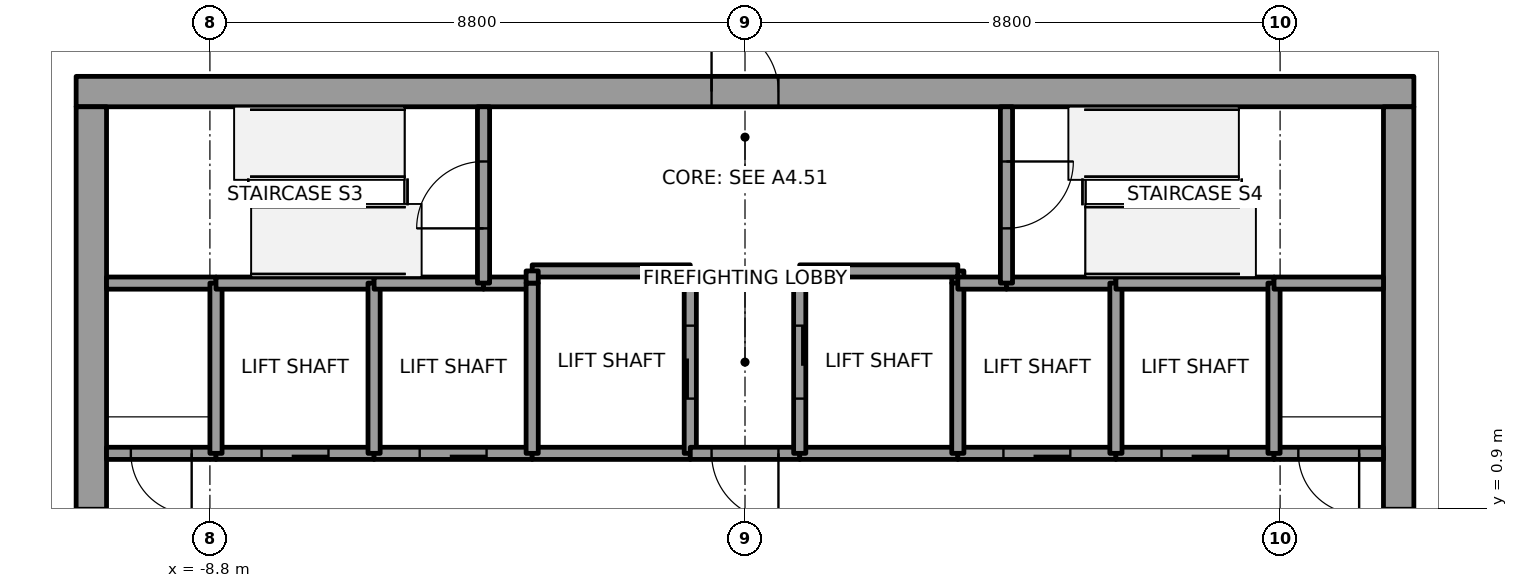
"""IFC4 building model, lengths in metres.
Left out: names, types, materials, properties, quantities, classifications, styles, units other than length and angle.
Written with IfcOpenShell. Run it as: python <this file> out.ifc"""

import sys

from ifc_helpers import new_model, si_unit, direction, frame, frame_2d, origin, place, context, subcontext, project, spatial, rectangle, extrude, element, fill, save


model = new_model("IFC4")
c1 = context("Model", 3, precision=1e-05, world=origin(), true_north=direction((0.0, 1.0)))
c2 = subcontext(c1, "Body", "Model", "MODEL_VIEW")
j1 = project(units=[si_unit("LENGTHUNIT", "METRE"), si_unit("PLANEANGLEUNIT", "RADIAN")], contexts=[c1])
p1 = place(None, origin())
s1 = spatial("IfcSite", under=j1, at=p1, CompositionType="ELEMENT")
p2 = place(p1, origin())
s2 = spatial("IfcBuilding", under=s1, at=p2, CompositionType="ELEMENT")
p3 = place(p2, frame((0.0, 0.0, 219.8)))
s3 = spatial("IfcBuildingStorey", under=s2, at=p3, CompositionType="ELEMENT", Elevation=219.8)
p4 = place(p3, frame((-11.0, 7.75, 0.0), z_axis=(0.0, 0.0, 1.0), x_axis=(1.0, 0.0, 0.0)))
e1 = element("IfcWall", 1, at=p4, inside=s3, PredefinedType="SHEAR", context=c2, shape_type="SweptSolid", body=[
    extrude(rectangle(XDim=22.0, YDim=0.5, at=frame_2d((11.0, 0.0))), origin(), (0.0, 0.0, 1.0), 7.2),
])
p5 = place(p4, frame((10.45, 0.0, 0.0)))
e2 = element("IfcOpeningElement", 2, at=p5, cuts=e1, PredefinedType="OPENING", context=c2, shape_type="SweptSolid", body=[
    extrude(rectangle(XDim=1.1, YDim=2.1, at=frame_2d((0.55, 1.05))), frame((0.0, 0.25, 0.0), z_axis=(0.0, -1.0, 0.0), x_axis=(1.0, 0.0, 0.0)), (0.0, 0.0, 1.0), 0.5),
])
p6 = place(p3, frame((-10.75, -7.5, 0.0), z_axis=(0.0, 0.0, 1.0), x_axis=(0.0, 1.0, 0.0)))
e3 = element("IfcWall", 3, at=p6, inside=s3, PredefinedType="SHEAR", context=c2, shape_type="SweptSolid", body=[
    extrude(rectangle(XDim=15.0, YDim=0.5, at=frame_2d((7.5, 0.0))), origin(), (0.0, 0.0, 1.0), 7.2),
])
p7 = place(p6, frame((6.6, 0.0, 0.0)))
e4 = element("IfcOpeningElement", 4, at=p7, cuts=e3, PredefinedType="OPENING", context=c2, shape_type="SweptSolid", body=[
    extrude(rectangle(XDim=1.8, YDim=2.1, at=frame_2d((0.9, 1.05))), frame((0.0, 0.25, 0.0), z_axis=(0.0, -1.0, 0.0), x_axis=(1.0, 0.0, 0.0)), (0.0, 0.0, 1.0), 0.5),
])
p8 = place(p3, frame((10.75, -7.5, 0.0), z_axis=(0.0, 0.0, 1.0), x_axis=(0.0, 1.0, 0.0)))
e5 = element("IfcWall", 5, at=p8, inside=s3, PredefinedType="SHEAR", context=c2, shape_type="SweptSolid", body=[
    extrude(rectangle(XDim=15.0, YDim=0.5, at=frame_2d((7.5, 0.0))), origin(), (0.0, 0.0, 1.0), 7.2),
])
p9 = place(p8, frame((6.6, 0.0, 0.0)))
e6 = element("IfcOpeningElement", 6, at=p9, cuts=e5, PredefinedType="OPENING", context=c2, shape_type="SweptSolid", body=[
    extrude(rectangle(XDim=1.8, YDim=2.1, at=frame_2d((0.9, 1.05))), frame((0.0, 0.25, 0.0), z_axis=(0.0, -1.0, 0.0), x_axis=(1.0, 0.0, 0.0)), (0.0, 0.0, 1.0), 0.5),
])
p10 = place(p3, frame((-8.7, 1.8, 0.0), z_axis=(0.0, 0.0, 1.0), x_axis=(-1.0, 0.0, 0.0)))
e7 = element("IfcWall", 7, at=p10, inside=s3, PredefinedType="SOLIDWALL", context=c2, shape_type="SweptSolid", body=[
    extrude(rectangle(XDim=1.8, YDim=0.2, at=frame_2d((0.9, 0.0))), origin(), (0.0, 0.0, 1.0), 7.05),
])
p11 = place(p10, frame((0.4, 0.0, 0.0)))
e8 = element("IfcOpeningElement", 8, at=p11, cuts=e7, PredefinedType="OPENING", context=c2, shape_type="SweptSolid", body=[
    extrude(rectangle(XDim=1.0, YDim=2.1, at=frame_2d((0.5, 1.05))), frame((0.0, 0.1, 0.0), z_axis=(0.0, -1.0, 0.0), x_axis=(1.0, 0.0, 0.0)), (0.0, 0.0, 1.0), 0.2),
])
p12 = place(p3, frame((-8.7, 4.6, 0.0), z_axis=(0.0, 0.0, 1.0), x_axis=(-1.0, 0.0, 0.0)))
e9 = element("IfcWall", 9, at=p12, inside=s3, PredefinedType="SOLIDWALL", context=c2, shape_type="SweptSolid", body=[
    extrude(rectangle(XDim=1.8, YDim=0.2, at=frame_2d((0.9, 0.0))), origin(), (0.0, 0.0, 1.0), 7.05),
])
p13 = place(p3, frame((-6.1, 1.8, 0.0), z_axis=(0.0, 0.0, 1.0), x_axis=(-1.0, 0.0, 0.0)))
e10 = element("IfcWall", 10, at=p13, inside=s3, PredefinedType="SOLIDWALL", context=c2, shape_type="SweptSolid", body=[
    extrude(rectangle(XDim=2.6, YDim=0.2, at=frame_2d((1.3, 0.0))), origin(), (0.0, 0.0, 1.0), 7.05),
])
p14 = place(p13, frame((0.75, 0.0, 0.0)))
e11 = element("IfcOpeningElement", 11, at=p14, cuts=e10, PredefinedType="OPENING", context=c2, shape_type="SweptSolid", body=[
    extrude(rectangle(XDim=1.1, YDim=2.1, at=frame_2d((0.55, 1.05))), frame((0.0, 0.1, 0.0), z_axis=(0.0, -1.0, 0.0), x_axis=(1.0, 0.0, 0.0)), (0.0, 0.0, 1.0), 0.2),
])
p15 = place(p3, frame((-8.7, 1.8, 0.0), z_axis=(0.0, 0.0, 1.0), x_axis=(0.0, 1.0, 0.0)))
e12 = element("IfcWall", 12, at=p15, inside=s3, PredefinedType="SOLIDWALL", context=c2, shape_type="SweptSolid", body=[
    extrude(rectangle(XDim=2.8, YDim=0.2, at=frame_2d((1.4, 0.0))), origin(), (0.0, 0.0, 1.0), 7.05),
])
p16 = place(p3, frame((-6.1, 4.6, 0.0), z_axis=(0.0, 0.0, 1.0), x_axis=(-1.0, 0.0, 0.0)))
e13 = element("IfcWall", 13, at=p16, inside=s3, PredefinedType="SOLIDWALL", context=c2, shape_type="SweptSolid", body=[
    extrude(rectangle(XDim=2.6, YDim=0.2, at=frame_2d((1.3, 0.0))), origin(), (0.0, 0.0, 1.0), 7.05),
])
p17 = place(p3, frame((-3.5, 1.8, 0.0), z_axis=(0.0, 0.0, 1.0), x_axis=(-1.0, 0.0, 0.0)))
e14 = element("IfcWall", 14, at=p17, inside=s3, PredefinedType="SOLIDWALL", context=c2, shape_type="SweptSolid", body=[
    extrude(rectangle(XDim=2.6, YDim=0.2, at=frame_2d((1.3, 0.0))), origin(), (0.0, 0.0, 1.0), 7.05),
])
p18 = place(p17, frame((0.75, 0.0, 0.0)))
e15 = element("IfcOpeningElement", 15, at=p18, cuts=e14, PredefinedType="OPENING", context=c2, shape_type="SweptSolid", body=[
    extrude(rectangle(XDim=1.1, YDim=2.1, at=frame_2d((0.55, 1.05))), frame((0.0, 0.1, 0.0), z_axis=(0.0, -1.0, 0.0), x_axis=(1.0, 0.0, 0.0)), (0.0, 0.0, 1.0), 0.2),
])
p19 = place(p3, frame((-6.1, 1.8, 0.0), z_axis=(0.0, 0.0, 1.0), x_axis=(0.0, 1.0, 0.0)))
e16 = element("IfcWall", 16, at=p19, inside=s3, PredefinedType="SOLIDWALL", context=c2, shape_type="SweptSolid", body=[
    extrude(rectangle(XDim=2.8, YDim=0.2, at=frame_2d((1.4, 0.0))), origin(), (0.0, 0.0, 1.0), 7.05),
])
p20 = place(p3, frame((-4.3, 4.6, 0.0), z_axis=(0.0, 0.0, 1.0), x_axis=(-1.0, 0.0, 0.0)))
e17 = element("IfcWall", 17, at=p20, inside=s3, PredefinedType="SOLIDWALL", context=c2, shape_type="SweptSolid", body=[
    extrude(rectangle(XDim=1.8, YDim=0.2, at=frame_2d((0.9, 0.0))), origin(), (0.0, 0.0, 1.0), 7.05),
])
p21 = place(p3, frame((-3.5, 4.6, 0.0), z_axis=(0.0, 0.0, 1.0), x_axis=(-1.0, 0.0, 0.0)))
e18 = element("IfcWall", 18, at=p21, inside=s3, PredefinedType="SOLIDWALL", context=c2, shape_type="SweptSolid", body=[
    extrude(rectangle(XDim=0.8, YDim=0.2, at=frame_2d((0.4, 0.0))), origin(), (0.0, 0.0, 1.0), 7.05),
])
p22 = place(p3, frame((-4.3, 4.6, 0.0), z_axis=(0.0, 0.0, 1.0), x_axis=(0.0, 1.0, 0.0)))
e19 = element("IfcWall", 19, at=p22, inside=s3, PredefinedType="SOLIDWALL", context=c2, shape_type="SweptSolid", body=[
    extrude(rectangle(XDim=2.9, YDim=0.2, at=frame_2d((1.45, 0.0))), origin(), (0.0, 0.0, 1.0), 7.05),
])
p23 = place(p22, frame((0.9, 0.0, 0.0)))
e20 = element("IfcOpeningElement", 20, at=p23, cuts=e19, PredefinedType="OPENING", context=c2, shape_type="SweptSolid", body=[
    extrude(rectangle(XDim=1.1, YDim=2.1, at=frame_2d((0.55, 1.05))), frame((0.0, 0.1, 0.0), z_axis=(0.0, -1.0, 0.0), x_axis=(1.0, 0.0, 0.0)), (0.0, 0.0, 1.0), 0.2),
])
p24 = place(p3, frame((-0.9, 1.8, 0.0), z_axis=(0.0, 0.0, 1.0), x_axis=(-1.0, 0.0, 0.0)))
e21 = element("IfcWall", 21, at=p24, inside=s3, PredefinedType="SOLIDWALL", context=c2, shape_type="SweptSolid", body=[
    extrude(rectangle(XDim=2.6, YDim=0.2, at=frame_2d((1.3, 0.0))), origin(), (0.0, 0.0, 1.0), 7.05),
])
p25 = place(p3, frame((-3.5, 4.6, 0.0), z_axis=(0.0, 0.0, 1.0), x_axis=(0.0, -1.0, 0.0)))
e22 = element("IfcWall", 22, at=p25, inside=s3, PredefinedType="SOLIDWALL", context=c2, shape_type="SweptSolid", body=[
    extrude(rectangle(XDim=2.8, YDim=0.2, at=frame_2d((1.4, 0.0))), origin(), (0.0, 0.0, 1.0), 7.05),
])
p26 = place(p3, frame((-0.9, 1.8, 0.0), z_axis=(0.0, 0.0, 1.0), x_axis=(0.0, 1.0, 0.0)))
e23 = element("IfcWall", 23, at=p26, inside=s3, PredefinedType="SOLIDWALL", context=c2, shape_type="SweptSolid", body=[
    extrude(rectangle(XDim=3.0, YDim=0.2, at=frame_2d((1.5, 0.0))), origin(), (0.0, 0.0, 1.0), 7.05),
])
p27 = place(p26, frame((0.9, 0.0, 0.0)))
e24 = element("IfcOpeningElement", 24, at=p27, cuts=e23, PredefinedType="OPENING", context=c2, shape_type="SweptSolid", body=[
    extrude(rectangle(XDim=1.2, YDim=2.1, at=frame_2d((0.6, 1.05))), frame((0.0, 0.1, 0.0), z_axis=(0.0, -1.0, 0.0), x_axis=(1.0, 0.0, 0.0)), (0.0, 0.0, 1.0), 0.2),
])
p28 = place(p3, frame((-0.9, 4.8, 0.0), z_axis=(0.0, 0.0, 1.0), x_axis=(-1.0, 0.0, 0.0)))
e25 = element("IfcWall", 25, at=p28, inside=s3, PredefinedType="SOLIDWALL", context=c2, shape_type="SweptSolid", body=[
    extrude(rectangle(XDim=2.6, YDim=0.2, at=frame_2d((1.3, 0.0))), origin(), (0.0, 0.0, 1.0), 7.05),
])
p29 = place(p3, frame((-3.5, 4.8, 0.0), z_axis=(0.0, 0.0, 1.0), x_axis=(0.0, -1.0, 0.0)))
e26 = element("IfcWall", 26, at=p29, inside=s3, PredefinedType="SOLIDWALL", context=c2, shape_type="SweptSolid", body=[
    extrude(rectangle(XDim=0.2, YDim=0.2, at=frame_2d((0.1, 0.0))), origin(), (0.0, 0.0, 1.0), 7.05),
])
p30 = place(p3, frame((0.9, 1.8, 0.0), z_axis=(0.0, 0.0, 1.0), x_axis=(-1.0, 0.0, 0.0)))
e27 = element("IfcWall", 27, at=p30, inside=s3, PredefinedType="SOLIDWALL", context=c2, shape_type="SweptSolid", body=[
    extrude(rectangle(XDim=1.8, YDim=0.2, at=frame_2d((0.9, 0.0))), origin(), (0.0, 0.0, 1.0), 7.05),
])
p31 = place(p30, frame((0.35, 0.0, 0.0)))
e28 = element("IfcOpeningElement", 28, at=p31, cuts=e27, PredefinedType="OPENING", context=c2, shape_type="SweptSolid", body=[
    extrude(rectangle(XDim=1.1, YDim=2.1, at=frame_2d((0.55, 1.05))), frame((0.0, 0.1, 0.0), z_axis=(0.0, -1.0, 0.0), x_axis=(1.0, 0.0, 0.0)), (0.0, 0.0, 1.0), 0.2),
])
p32 = place(p3, frame((3.5, 1.8, 0.0), z_axis=(0.0, 0.0, 1.0), x_axis=(-1.0, 0.0, 0.0)))
e29 = element("IfcWall", 29, at=p32, inside=s3, PredefinedType="SOLIDWALL", context=c2, shape_type="SweptSolid", body=[
    extrude(rectangle(XDim=2.6, YDim=0.2, at=frame_2d((1.3, 0.0))), origin(), (0.0, 0.0, 1.0), 7.05),
])
p33 = place(p3, frame((3.5, 4.6, 0.0), z_axis=(0.0, 0.0, 1.0), x_axis=(0.0, 1.0, 0.0)))
e30 = element("IfcWall", 30, at=p33, inside=s3, PredefinedType="SOLIDWALL", context=c2, shape_type="SweptSolid", body=[
    extrude(rectangle(XDim=0.2, YDim=0.2, at=frame_2d((0.1, 0.0))), origin(), (0.0, 0.0, 1.0), 7.05),
])
p34 = place(p3, frame((3.5, 4.8, 0.0), z_axis=(0.0, 0.0, 1.0), x_axis=(-1.0, 0.0, 0.0)))
e31 = element("IfcWall", 31, at=p34, inside=s3, PredefinedType="SOLIDWALL", context=c2, shape_type="SweptSolid", body=[
    extrude(rectangle(XDim=2.6, YDim=0.2, at=frame_2d((1.3, 0.0))), origin(), (0.0, 0.0, 1.0), 7.05),
])
p35 = place(p3, frame((0.9, 4.8, 0.0), z_axis=(0.0, 0.0, 1.0), x_axis=(0.0, -1.0, 0.0)))
e32 = element("IfcWall", 32, at=p35, inside=s3, PredefinedType="SOLIDWALL", context=c2, shape_type="SweptSolid", body=[
    extrude(rectangle(XDim=3.0, YDim=0.2, at=frame_2d((1.5, 0.0))), origin(), (0.0, 0.0, 1.0), 7.05),
])
p36 = place(p35, frame((0.9, 0.0, 0.0)))
e33 = element("IfcOpeningElement", 33, at=p36, cuts=e32, PredefinedType="OPENING", context=c2, shape_type="SweptSolid", body=[
    extrude(rectangle(XDim=1.2, YDim=2.1, at=frame_2d((0.6, 1.05))), frame((0.0, 0.1, 0.0), z_axis=(0.0, -1.0, 0.0), x_axis=(1.0, 0.0, 0.0)), (0.0, 0.0, 1.0), 0.2),
])
p37 = place(p3, frame((6.1, 1.8, 0.0), z_axis=(0.0, 0.0, 1.0), x_axis=(-1.0, 0.0, 0.0)))
e34 = element("IfcWall", 34, at=p37, inside=s3, PredefinedType="SOLIDWALL", context=c2, shape_type="SweptSolid", body=[
    extrude(rectangle(XDim=2.6, YDim=0.2, at=frame_2d((1.3, 0.0))), origin(), (0.0, 0.0, 1.0), 7.05),
])
p38 = place(p37, frame((0.75, 0.0, 0.0)))
e35 = element("IfcOpeningElement", 35, at=p38, cuts=e34, PredefinedType="OPENING", context=c2, shape_type="SweptSolid", body=[
    extrude(rectangle(XDim=1.1, YDim=2.1, at=frame_2d((0.55, 1.05))), frame((0.0, 0.1, 0.0), z_axis=(0.0, -1.0, 0.0), x_axis=(1.0, 0.0, 0.0)), (0.0, 0.0, 1.0), 0.2),
])
p39 = place(p3, frame((3.5, 1.8, 0.0), z_axis=(0.0, 0.0, 1.0), x_axis=(0.0, 1.0, 0.0)))
e36 = element("IfcWall", 36, at=p39, inside=s3, PredefinedType="SOLIDWALL", context=c2, shape_type="SweptSolid", body=[
    extrude(rectangle(XDim=2.8, YDim=0.2, at=frame_2d((1.4, 0.0))), origin(), (0.0, 0.0, 1.0), 7.05),
])
p40 = place(p3, frame((4.3, 4.6, 0.0), z_axis=(0.0, 0.0, 1.0), x_axis=(-1.0, 0.0, 0.0)))
e37 = element("IfcWall", 37, at=p40, inside=s3, PredefinedType="SOLIDWALL", context=c2, shape_type="SweptSolid", body=[
    extrude(rectangle(XDim=0.8, YDim=0.2, at=frame_2d((0.4, 0.0))), origin(), (0.0, 0.0, 1.0), 7.05),
])
p41 = place(p3, frame((6.1, 4.6, 0.0), z_axis=(0.0, 0.0, 1.0), x_axis=(-1.0, 0.0, 0.0)))
e38 = element("IfcWall", 38, at=p41, inside=s3, PredefinedType="SOLIDWALL", context=c2, shape_type="SweptSolid", body=[
    extrude(rectangle(XDim=1.8, YDim=0.2, at=frame_2d((0.9, 0.0))), origin(), (0.0, 0.0, 1.0), 7.05),
])
p42 = place(p3, frame((4.3, 7.5, 0.0), z_axis=(0.0, 0.0, 1.0), x_axis=(0.0, -1.0, 0.0)))
e39 = element("IfcWall", 39, at=p42, inside=s3, PredefinedType="SOLIDWALL", context=c2, shape_type="SweptSolid", body=[
    extrude(rectangle(XDim=2.9, YDim=0.2, at=frame_2d((1.45, 0.0))), origin(), (0.0, 0.0, 1.0), 7.05),
])
p43 = place(p42, frame((0.9, 0.0, 0.0)))
e40 = element("IfcOpeningElement", 40, at=p43, cuts=e39, PredefinedType="OPENING", context=c2, shape_type="SweptSolid", body=[
    extrude(rectangle(XDim=1.1, YDim=2.1, at=frame_2d((0.55, 1.05))), frame((0.0, 0.1, 0.0), z_axis=(0.0, -1.0, 0.0), x_axis=(1.0, 0.0, 0.0)), (0.0, 0.0, 1.0), 0.2),
])
p44 = place(p3, frame((8.7, 1.8, 0.0), z_axis=(0.0, 0.0, 1.0), x_axis=(-1.0, 0.0, 0.0)))
e41 = element("IfcWall", 41, at=p44, inside=s3, PredefinedType="SOLIDWALL", context=c2, shape_type="SweptSolid", body=[
    extrude(rectangle(XDim=2.6, YDim=0.2, at=frame_2d((1.3, 0.0))), origin(), (0.0, 0.0, 1.0), 7.05),
])
p45 = place(p44, frame((0.75, 0.0, 0.0)))
e42 = element("IfcOpeningElement", 42, at=p45, cuts=e41, PredefinedType="OPENING", context=c2, shape_type="SweptSolid", body=[
    extrude(rectangle(XDim=1.1, YDim=2.1, at=frame_2d((0.55, 1.05))), frame((0.0, 0.1, 0.0), z_axis=(0.0, -1.0, 0.0), x_axis=(1.0, 0.0, 0.0)), (0.0, 0.0, 1.0), 0.2),
])
p46 = place(p3, frame((6.1, 1.8, 0.0), z_axis=(0.0, 0.0, 1.0), x_axis=(0.0, 1.0, 0.0)))
e43 = element("IfcWall", 43, at=p46, inside=s3, PredefinedType="SOLIDWALL", context=c2, shape_type="SweptSolid", body=[
    extrude(rectangle(XDim=2.8, YDim=0.2, at=frame_2d((1.4, 0.0))), origin(), (0.0, 0.0, 1.0), 7.05),
])
p47 = place(p3, frame((8.7, 4.6, 0.0), z_axis=(0.0, 0.0, 1.0), x_axis=(-1.0, 0.0, 0.0)))
e44 = element("IfcWall", 44, at=p47, inside=s3, PredefinedType="SOLIDWALL", context=c2, shape_type="SweptSolid", body=[
    extrude(rectangle(XDim=2.6, YDim=0.2, at=frame_2d((1.3, 0.0))), origin(), (0.0, 0.0, 1.0), 7.05),
])
p48 = place(p3, frame((10.5, 1.8, 0.0), z_axis=(0.0, 0.0, 1.0), x_axis=(-1.0, 0.0, 0.0)))
e45 = element("IfcWall", 45, at=p48, inside=s3, PredefinedType="SOLIDWALL", context=c2, shape_type="SweptSolid", body=[
    extrude(rectangle(XDim=1.8, YDim=0.2, at=frame_2d((0.9, 0.0))), origin(), (0.0, 0.0, 1.0), 7.05),
])
p49 = place(p48, frame((0.4, 0.0, 0.0)))
e46 = element("IfcOpeningElement", 46, at=p49, cuts=e45, PredefinedType="OPENING", context=c2, shape_type="SweptSolid", body=[
    extrude(rectangle(XDim=1.0, YDim=2.1, at=frame_2d((0.5, 1.05))), frame((0.0, 0.1, 0.0), z_axis=(0.0, -1.0, 0.0), x_axis=(1.0, 0.0, 0.0)), (0.0, 0.0, 1.0), 0.2),
])
p50 = place(p3, frame((8.7, 4.6, 0.0), z_axis=(0.0, 0.0, 1.0), x_axis=(0.0, -1.0, 0.0)))
e47 = element("IfcWall", 47, at=p50, inside=s3, PredefinedType="SOLIDWALL", context=c2, shape_type="SweptSolid", body=[
    extrude(rectangle(XDim=2.8, YDim=0.2, at=frame_2d((1.4, 0.0))), origin(), (0.0, 0.0, 1.0), 7.05),
])
p51 = place(p3, frame((10.5, 4.6, 0.0), z_axis=(0.0, 0.0, 1.0), x_axis=(-1.0, 0.0, 0.0)))
e48 = element("IfcWall", 48, at=p51, inside=s3, PredefinedType="SOLIDWALL", context=c2, shape_type="SweptSolid", body=[
    extrude(rectangle(XDim=1.8, YDim=0.2, at=frame_2d((0.9, 0.0))), origin(), (0.0, 0.0, 1.0), 7.05),
])
p52 = place(p14, origin())
e49 = element("IfcDoor", 49, at=p52, inside=s3, OperationType="SLIDING_TO_RIGHT", PredefinedType="DOOR", context=c2, shape_type="SweptSolid", body=[
    extrude(rectangle(XDim=1.1, YDim=2.1, at=frame_2d((0.55, 1.05))), frame((0.0, 0.025, 0.0), z_axis=(0.0, -1.0, 0.0), x_axis=(1.0, 0.0, 0.0)), (0.0, 0.0, 1.0), 0.05),
])
fill(e11, e49)
p53 = place(p18, origin())
e50 = element("IfcDoor", 50, at=p53, inside=s3, OperationType="SLIDING_TO_LEFT", PredefinedType="DOOR", context=c2, shape_type="SweptSolid", body=[
    extrude(rectangle(XDim=1.1, YDim=2.1, at=frame_2d((0.55, 1.05))), frame((0.0, 0.025, 0.0), z_axis=(0.0, -1.0, 0.0), x_axis=(1.0, 0.0, 0.0)), (0.0, 0.0, 1.0), 0.05),
])
fill(e15, e50)
p54 = place(p38, origin())
e51 = element("IfcDoor", 51, at=p54, inside=s3, OperationType="SLIDING_TO_RIGHT", PredefinedType="DOOR", context=c2, shape_type="SweptSolid", body=[
    extrude(rectangle(XDim=1.1, YDim=2.1, at=frame_2d((0.55, 1.05))), frame((0.0, 0.025, 0.0), z_axis=(0.0, -1.0, 0.0), x_axis=(1.0, 0.0, 0.0)), (0.0, 0.0, 1.0), 0.05),
])
fill(e35, e51)
p55 = place(p45, origin())
e52 = element("IfcDoor", 52, at=p55, inside=s3, OperationType="SLIDING_TO_LEFT", PredefinedType="DOOR", context=c2, shape_type="SweptSolid", body=[
    extrude(rectangle(XDim=1.1, YDim=2.1, at=frame_2d((0.55, 1.05))), frame((0.0, 0.025, 0.0), z_axis=(0.0, -1.0, 0.0), x_axis=(1.0, 0.0, 0.0)), (0.0, 0.0, 1.0), 0.05),
])
fill(e42, e52)
p56 = place(p27, origin())
e53 = element("IfcDoor", 53, at=p56, inside=s3, OperationType="SLIDING_TO_RIGHT", PredefinedType="DOOR", context=c2, shape_type="SweptSolid", body=[
    extrude(rectangle(XDim=1.2, YDim=2.1, at=frame_2d((0.6, 1.05))), frame((0.0, 0.025, 0.0), z_axis=(0.0, -1.0, 0.0), x_axis=(1.0, 0.0, 0.0)), (0.0, 0.0, 1.0), 0.05),
])
fill(e24, e53)
p57 = place(p36, origin())
e54 = element("IfcDoor", 54, at=p57, inside=s3, OperationType="SLIDING_TO_RIGHT", PredefinedType="DOOR", context=c2, shape_type="SweptSolid", body=[
    extrude(rectangle(XDim=1.2, YDim=2.1, at=frame_2d((0.6, 1.05))), frame((0.0, 0.025, 0.0), z_axis=(0.0, -1.0, 0.0), x_axis=(1.0, 0.0, 0.0)), (0.0, 0.0, 1.0), 0.05),
])
fill(e33, e54)
p58 = place(p31, origin())
e55 = element("IfcDoor", 55, at=p58, inside=s3, OperationType="SINGLE_SWING_RIGHT", PredefinedType="DOOR", context=c2, shape_type="SweptSolid", body=[
    extrude(rectangle(XDim=1.1, YDim=2.1, at=frame_2d((0.55, 1.05))), frame((0.0, 0.025, 0.0), z_axis=(0.0, -1.0, 0.0), x_axis=(1.0, 0.0, 0.0)), (0.0, 0.0, 1.0), 0.05),
])
fill(e28, e55)
p59 = place(p11, origin())
e56 = element("IfcDoor", 56, at=p59, inside=s3, OperationType="SINGLE_SWING_LEFT", PredefinedType="DOOR", context=c2, shape_type="SweptSolid", body=[
    extrude(rectangle(XDim=1.0, YDim=2.1, at=frame_2d((0.5, 1.05))), frame((0.0, 0.025, 0.0), z_axis=(0.0, -1.0, 0.0), x_axis=(1.0, 0.0, 0.0)), (0.0, 0.0, 1.0), 0.05),
])
fill(e8, e56)
p60 = place(p49, origin())
e57 = element("IfcDoor", 57, at=p60, inside=s3, OperationType="SINGLE_SWING_RIGHT", PredefinedType="DOOR", context=c2, shape_type="SweptSolid", body=[
    extrude(rectangle(XDim=1.0, YDim=2.1, at=frame_2d((0.5, 1.05))), frame((0.0, 0.025, 0.0), z_axis=(0.0, -1.0, 0.0), x_axis=(1.0, 0.0, 0.0)), (0.0, 0.0, 1.0), 0.05),
])
fill(e46, e57)
p61 = place(p23, origin())
e58 = element("IfcDoor", 58, at=p61, inside=s3, OperationType="SINGLE_SWING_LEFT", PredefinedType="DOOR", context=c2, shape_type="SweptSolid", body=[
    extrude(rectangle(XDim=1.1, YDim=2.1, at=frame_2d((0.55, 1.05))), frame((0.0, 0.025, 0.0), z_axis=(0.0, -1.0, 0.0), x_axis=(1.0, 0.0, 0.0)), (0.0, 0.0, 1.0), 0.05),
])
fill(e20, e58)
p62 = place(p43, origin())
e59 = element("IfcDoor", 59, at=p62, inside=s3, OperationType="SINGLE_SWING_RIGHT", PredefinedType="DOOR", context=c2, shape_type="SweptSolid", body=[
    extrude(rectangle(XDim=1.1, YDim=2.1, at=frame_2d((0.55, 1.05))), frame((0.0, 0.025, 0.0), z_axis=(0.0, -1.0, 0.0), x_axis=(1.0, 0.0, 0.0)), (0.0, 0.0, 1.0), 0.05),
])
fill(e40, e59)
p63 = place(p7, origin())
e60 = element("IfcDoor", 60, at=p63, inside=s3, OperationType="DOUBLE_DOOR_SINGLE_SWING", PredefinedType="DOOR", context=c2, shape_type="SweptSolid", body=[
    extrude(rectangle(XDim=1.8, YDim=2.1, at=frame_2d((0.9, 1.05))), frame((0.0, 0.025, 0.0), z_axis=(0.0, -1.0, 0.0), x_axis=(1.0, 0.0, 0.0)), (0.0, 0.0, 1.0), 0.05),
])
fill(e4, e60)
p64 = place(p9, origin())
e61 = element("IfcDoor", 61, at=p64, inside=s3, OperationType="DOUBLE_DOOR_SINGLE_SWING", PredefinedType="DOOR", context=c2, shape_type="SweptSolid", body=[
    extrude(rectangle(XDim=1.8, YDim=2.1, at=frame_2d((0.9, 1.05))), frame((0.0, 0.025, 0.0), z_axis=(0.0, -1.0, 0.0), x_axis=(1.0, 0.0, 0.0)), (0.0, 0.0, 1.0), 0.05),
])
fill(e6, e61)
p65 = place(p5, origin())
e62 = element("IfcDoor", 62, at=p65, inside=s3, OperationType="SINGLE_SWING_RIGHT", PredefinedType="DOOR", context=c2, shape_type="SweptSolid", body=[
    extrude(rectangle(XDim=1.1, YDim=2.1, at=frame_2d((0.55, 1.05))), frame((0.0, 0.025, 0.0), z_axis=(0.0, -1.0, 0.0), x_axis=(1.0, 0.0, 0.0)), (0.0, 0.0, 1.0), 0.05),
])
fill(e2, e62)
save(model, sys.argv[1])
